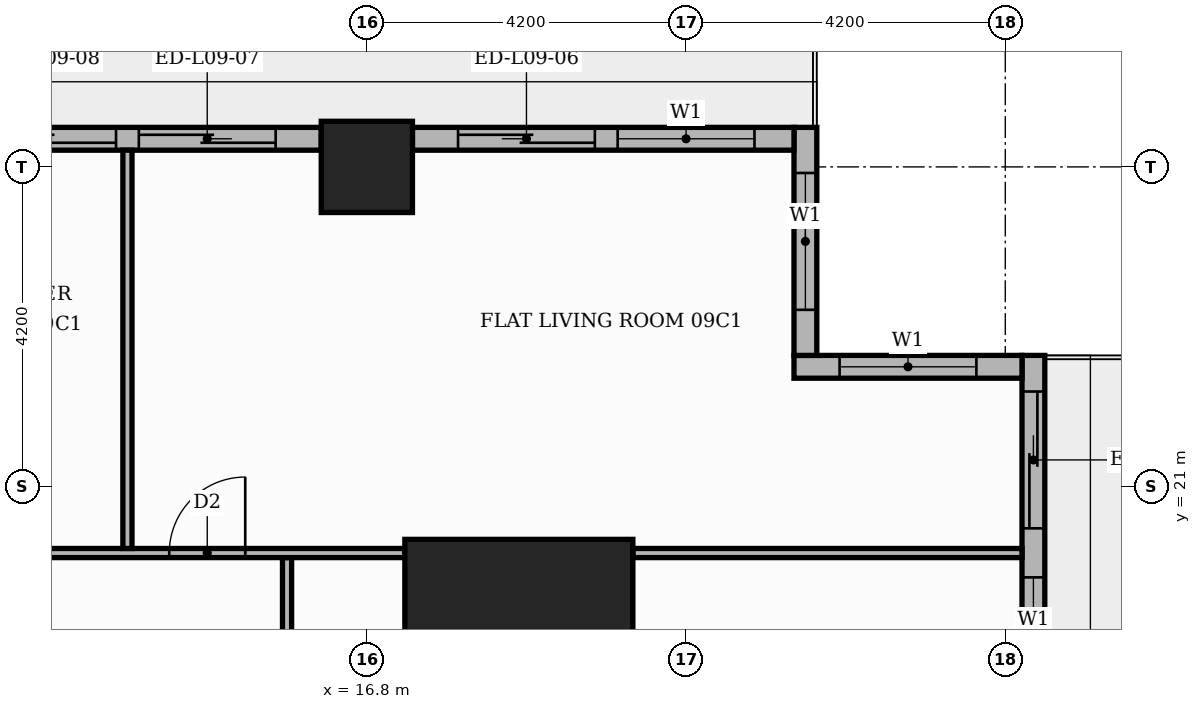
"""IFC4 building model, lengths in metres.
Left out: names, types, materials, properties, quantities, classifications, styles, units other than length and angle.
Written with IfcOpenShell. Run it as: python <this file> out.ifc"""

import sys

from ifc_helpers import new_model, si_unit, direction, frame, frame_2d, origin, origin_2d, place, context, subcontext, project, spatial, rectangle, extrude, element, fill, save


model = new_model("IFC4")
c1 = context("Model", 3, precision=1e-05, world=origin(), true_north=direction((0.0, 1.0)))
c2 = subcontext(c1, "Body", "Model", "MODEL_VIEW")
j1 = project(units=[si_unit("LENGTHUNIT", "METRE"), si_unit("PLANEANGLEUNIT", "RADIAN")], contexts=[c1])
p1 = place(None, origin())
s1 = spatial("IfcSite", under=j1, at=p1, CompositionType="ELEMENT")
p2 = place(p1, origin())
s2 = spatial("IfcBuilding", under=s1, at=p2, CompositionType="ELEMENT")
p3 = place(p2, frame((0.0, 0.0, 42.6)))
s3 = spatial("IfcBuildingStorey", under=s2, at=p3, CompositionType="ELEMENT", Elevation=42.6)
p4 = place(p3, frame((18.8, 18.8, 0.0), z_axis=(0.0, 0.0, 1.0), x_axis=(1.0, 0.0, 0.0)))
e1 = element("IfcColumn", 1, at=p4, inside=s3, PredefinedType="COLUMN", context=c2, shape_type="SweptSolid", body=[
    extrude(rectangle(XDim=3.0, YDim=3.0, at=origin_2d()), origin(), (0.0, 0.0, 1.0), 3.9),
])
p5 = place(p3, frame((16.8, 25.2, 0.0), z_axis=(0.0, 0.0, 1.0), x_axis=(1.0, 0.0, 0.0)))
e2 = element("IfcColumn", 2, at=p5, inside=s3, PredefinedType="COLUMN", context=c2, shape_type="SweptSolid", body=[
    extrude(rectangle(XDim=1.2, YDim=1.2, at=origin_2d()), origin(), (0.0, 0.0, 1.0), 3.9),
])
p6 = place(p3, frame((25.57, 17.4, 0.0), z_axis=(0.0, 0.0, 1.0), x_axis=(0.0, 1.0, 0.0)))
e3 = element("IfcWall", 3, at=p6, inside=s3, PredefinedType="STANDARD", context=c2, shape_type="SweptSolid", body=[
    extrude(rectangle(XDim=5.32, YDim=0.3, at=frame_2d((2.66, 0.0))), origin(), (0.0, 0.0, 1.0), 3.48),
])
p7 = place(p6, frame((0.6, 0.0, 0.9)))
e4 = element("IfcOpeningElement", 4, at=p7, cuts=e3, PredefinedType="OPENING", context=c2, shape_type="SweptSolid", body=[
    extrude(rectangle(XDim=1.8, YDim=2.1, at=frame_2d((0.9, 1.05))), frame((0.0, 0.16, 0.0), z_axis=(0.0, -1.0, 0.0), x_axis=(1.0, 0.0, 0.0)), (0.0, 0.0, 1.0), 0.32),
])
p8 = place(p6, frame((3.045, 0.0, 0.0)))
e5 = element("IfcOpeningElement", 5, at=p8, cuts=e3, PredefinedType="OPENING", context=c2, shape_type="SweptSolid", body=[
    extrude(rectangle(XDim=1.8, YDim=2.4, at=frame_2d((0.9, 1.2))), frame((0.0, 0.16, 0.0), z_axis=(0.0, -1.0, 0.0), x_axis=(1.0, 0.0, 0.0)), (0.0, 0.0, 1.0), 0.32),
])
p9 = place(p3, frame((25.42, 22.57, 0.0), z_axis=(0.0, 0.0, 1.0), x_axis=(-1.0, 0.0, 0.0)))
e6 = element("IfcWall", 6, at=p9, inside=s3, PredefinedType="STANDARD", context=c2, shape_type="SweptSolid", body=[
    extrude(rectangle(XDim=3.0, YDim=0.3, at=frame_2d((1.5, 0.0))), origin(), (0.0, 0.0, 1.0), 3.48),
])
p10 = place(p9, frame((0.6, 0.0, 0.9)))
e7 = element("IfcOpeningElement", 7, at=p10, cuts=e6, PredefinedType="OPENING", context=c2, shape_type="SweptSolid", body=[
    extrude(rectangle(XDim=1.8, YDim=2.1, at=frame_2d((0.9, 1.05))), frame((0.0, 0.16, 0.0), z_axis=(0.0, -1.0, 0.0), x_axis=(1.0, 0.0, 0.0)), (0.0, 0.0, 1.0), 0.32),
])
p11 = place(p3, frame((22.57, 22.72, 0.0), z_axis=(0.0, 0.0, 1.0), x_axis=(0.0, 1.0, 0.0)))
e8 = element("IfcWall", 8, at=p11, inside=s3, PredefinedType="STANDARD", context=c2, shape_type="SweptSolid", body=[
    extrude(rectangle(XDim=3.0, YDim=0.3, at=frame_2d((1.5, 0.0))), origin(), (0.0, 0.0, 1.0), 3.48),
])
p12 = place(p11, frame((0.6, 0.0, 0.9)))
e9 = element("IfcOpeningElement", 9, at=p12, cuts=e8, PredefinedType="OPENING", context=c2, shape_type="SweptSolid", body=[
    extrude(rectangle(XDim=1.8, YDim=2.1, at=frame_2d((0.9, 1.05))), frame((0.0, 0.16, 0.0), z_axis=(0.0, -1.0, 0.0), x_axis=(1.0, 0.0, 0.0)), (0.0, 0.0, 1.0), 0.32),
])
p13 = place(p3, frame((22.42, 25.57, 0.0), z_axis=(0.0, 0.0, 1.0), x_axis=(-1.0, 0.0, 0.0)))
e10 = element("IfcWall", 10, at=p13, inside=s3, PredefinedType="STANDARD", context=c2, shape_type="SweptSolid", body=[
    extrude(rectangle(XDim=5.02, YDim=0.3, at=frame_2d((2.51, 0.0))), origin(), (0.0, 0.0, 1.0), 3.48),
])
p14 = place(p13, frame((0.52, 0.0, 0.9)))
e11 = element("IfcOpeningElement", 11, at=p14, cuts=e10, PredefinedType="OPENING", context=c2, shape_type="SweptSolid", body=[
    extrude(rectangle(XDim=1.8, YDim=2.1, at=frame_2d((0.9, 1.05))), frame((0.0, 0.16, 0.0), z_axis=(0.0, -1.0, 0.0), x_axis=(1.0, 0.0, 0.0)), (0.0, 0.0, 1.0), 0.32),
])
p15 = place(p13, frame((2.62, 0.0, 0.0)))
e12 = element("IfcOpeningElement", 12, at=p15, cuts=e10, PredefinedType="OPENING", context=c2, shape_type="SweptSolid", body=[
    extrude(rectangle(XDim=1.8, YDim=2.4, at=frame_2d((0.9, 1.2))), frame((0.0, 0.16, 0.0), z_axis=(0.0, -1.0, 0.0), x_axis=(1.0, 0.0, 0.0)), (0.0, 0.0, 1.0), 0.32),
])
p16 = place(p3, frame((16.2, 25.57, 0.0), z_axis=(0.0, 0.0, 1.0), x_axis=(-1.0, 0.0, 0.0)))
e13 = element("IfcWall", 13, at=p16, inside=s3, PredefinedType="STANDARD", context=c2, shape_type="SweptSolid", body=[
    extrude(rectangle(XDim=7.2, YDim=0.3, at=frame_2d((3.6, 0.0))), origin(), (0.0, 0.0, 1.0), 3.48),
])
p17 = place(p16, frame((0.6, 0.0, 0.0)))
e14 = element("IfcOpeningElement", 14, at=p17, cuts=e13, PredefinedType="OPENING", context=c2, shape_type="SweptSolid", body=[
    extrude(rectangle(XDim=1.8, YDim=2.4, at=frame_2d((0.9, 1.2))), frame((0.0, 0.16, 0.0), z_axis=(0.0, -1.0, 0.0), x_axis=(1.0, 0.0, 0.0)), (0.0, 0.0, 1.0), 0.32),
])
p18 = place(p16, frame((2.7, 0.0, 0.0)))
e15 = element("IfcOpeningElement", 15, at=p18, cuts=e13, PredefinedType="OPENING", context=c2, shape_type="SweptSolid", body=[
    extrude(rectangle(XDim=1.8, YDim=2.4, at=frame_2d((0.9, 1.2))), frame((0.0, 0.16, 0.0), z_axis=(0.0, -1.0, 0.0), x_axis=(1.0, 0.0, 0.0)), (0.0, 0.0, 1.0), 0.32),
])
p19 = place(p16, frame((4.8, 0.0, 0.9)))
e16 = element("IfcOpeningElement", 16, at=p19, cuts=e13, PredefinedType="OPENING", context=c2, shape_type="SweptSolid", body=[
    extrude(rectangle(XDim=1.8, YDim=2.1, at=frame_2d((0.9, 1.05))), frame((0.0, 0.16, 0.0), z_axis=(0.0, -1.0, 0.0), x_axis=(1.0, 0.0, 0.0)), (0.0, 0.0, 1.0), 0.32),
])
p20 = place(p3, frame((15.75, 13.75, 0.0), z_axis=(0.0, 0.0, 1.0), x_axis=(0.0, 1.0, 0.0)))
e17 = element("IfcWall", 17, at=p20, inside=s3, PredefinedType="PARTITIONING", context=c2, shape_type="SweptSolid", body=[
    extrude(rectangle(XDim=6.31, YDim=0.12, at=frame_2d((3.155, 0.0))), origin(), (0.0, 0.0, 1.0), 3.48),
])
p21 = place(p20, frame((2.635, 0.0, 0.0)))
e18 = element("IfcOpeningElement", 18, at=p21, cuts=e17, PredefinedType="OPENING", context=c2, shape_type="SweptSolid", body=[
    extrude(rectangle(XDim=1.0, YDim=2.1, at=frame_2d((0.5, 1.05))), frame((0.0, 0.07, 0.0), z_axis=(0.0, -1.0, 0.0), x_axis=(1.0, 0.0, 0.0)), (0.0, 0.0, 1.0), 0.14),
])
p22 = place(p3, frame((5.35, 20.12, 0.0), z_axis=(0.0, 0.0, 1.0), x_axis=(1.0, 0.0, 0.0)))
e19 = element("IfcWall", 19, at=p22, inside=s3, PredefinedType="PARTITIONING", context=c2, shape_type="SweptSolid", body=[
    extrude(rectangle(XDim=11.95, YDim=0.12, at=frame_2d((5.975, 0.0))), origin(), (0.0, 0.0, 1.0), 3.48),
])
p23 = place(p22, frame((8.85, 0.0, 0.0)))
e20 = element("IfcOpeningElement", 20, at=p23, cuts=e19, PredefinedType="OPENING", context=c2, shape_type="SweptSolid", body=[
    extrude(rectangle(XDim=1.0, YDim=2.1, at=frame_2d((0.5, 1.05))), frame((0.0, 0.07, 0.0), z_axis=(0.0, -1.0, 0.0), x_axis=(1.0, 0.0, 0.0)), (0.0, 0.0, 1.0), 0.14),
])
p24 = place(p22, frame((5.75, 0.0, 0.0)))
e21 = element("IfcOpeningElement", 21, at=p24, cuts=e19, PredefinedType="OPENING", context=c2, shape_type="SweptSolid", body=[
    extrude(rectangle(XDim=0.9, YDim=2.1, at=frame_2d((0.45, 1.05))), frame((0.0, 0.07, 0.0), z_axis=(0.0, -1.0, 0.0), x_axis=(1.0, 0.0, 0.0)), (0.0, 0.0, 1.0), 0.14),
])
p25 = place(p3, frame((20.3, 20.12, 0.0), z_axis=(0.0, 0.0, 1.0), x_axis=(1.0, 0.0, 0.0)))
e22 = element("IfcWall", 22, at=p25, inside=s3, PredefinedType="PARTITIONING", context=c2, shape_type="SweptSolid", body=[
    extrude(rectangle(XDim=5.12, YDim=0.12, at=frame_2d((2.56, 0.0))), origin(), (0.0, 0.0, 1.0), 3.48),
])
p26 = place(p3, frame((13.65, 20.18, 0.0), z_axis=(0.0, 0.0, 1.0), x_axis=(0.0, 1.0, 0.0)))
e23 = element("IfcWall", 23, at=p26, inside=s3, PredefinedType="PARTITIONING", context=c2, shape_type="SweptSolid", body=[
    extrude(rectangle(XDim=5.24, YDim=0.12, at=frame_2d((2.62, 0.0))), origin(), (0.0, 0.0, 1.0), 3.48),
])
p27 = place(p7, origin())
e24 = element("IfcWindow", 24, at=p27, inside=s3, PartitioningType="SINGLE_PANEL", PredefinedType="WINDOW", context=c2, shape_type="SweptSolid", body=[
    extrude(rectangle(XDim=1.8, YDim=2.1, at=frame_2d((0.9, 1.05))), frame((0.0, 0.03, 0.0), z_axis=(0.0, -1.0, 0.0), x_axis=(1.0, 0.0, 0.0)), (0.0, 0.0, 1.0), 0.06),
])
fill(e4, e24)
p28 = place(p8, origin())
e25 = element("IfcDoor", 25, at=p28, inside=s3, OperationType="SLIDING_TO_RIGHT", PredefinedType="DOOR", context=c2, shape_type="SweptSolid", body=[
    extrude(rectangle(XDim=1.8, YDim=2.4, at=frame_2d((0.9, 1.2))), frame((0.0, 0.025, 0.0), z_axis=(0.0, -1.0, 0.0), x_axis=(1.0, 0.0, 0.0)), (0.0, 0.0, 1.0), 0.05),
])
fill(e5, e25)
p29 = place(p10, origin())
e26 = element("IfcWindow", 26, at=p29, inside=s3, PartitioningType="SINGLE_PANEL", PredefinedType="WINDOW", context=c2, shape_type="SweptSolid", body=[
    extrude(rectangle(XDim=1.8, YDim=2.1, at=frame_2d((0.9, 1.05))), frame((0.0, 0.03, 0.0), z_axis=(0.0, -1.0, 0.0), x_axis=(1.0, 0.0, 0.0)), (0.0, 0.0, 1.0), 0.06),
])
fill(e7, e26)
p30 = place(p12, origin())
e27 = element("IfcWindow", 27, at=p30, inside=s3, PartitioningType="SINGLE_PANEL", PredefinedType="WINDOW", context=c2, shape_type="SweptSolid", body=[
    extrude(rectangle(XDim=1.8, YDim=2.1, at=frame_2d((0.9, 1.05))), frame((0.0, 0.03, 0.0), z_axis=(0.0, -1.0, 0.0), x_axis=(1.0, 0.0, 0.0)), (0.0, 0.0, 1.0), 0.06),
])
fill(e9, e27)
p31 = place(p14, origin())
e28 = element("IfcWindow", 28, at=p31, inside=s3, PartitioningType="SINGLE_PANEL", PredefinedType="WINDOW", context=c2, shape_type="SweptSolid", body=[
    extrude(rectangle(XDim=1.8, YDim=2.1, at=frame_2d((0.9, 1.05))), frame((0.0, 0.03, 0.0), z_axis=(0.0, -1.0, 0.0), x_axis=(1.0, 0.0, 0.0)), (0.0, 0.0, 1.0), 0.06),
])
fill(e11, e28)
p32 = place(p15, origin())
e29 = element("IfcDoor", 29, at=p32, inside=s3, OperationType="SLIDING_TO_RIGHT", PredefinedType="DOOR", context=c2, shape_type="SweptSolid", body=[
    extrude(rectangle(XDim=1.8, YDim=2.4, at=frame_2d((0.9, 1.2))), frame((0.0, 0.025, 0.0), z_axis=(0.0, -1.0, 0.0), x_axis=(1.0, 0.0, 0.0)), (0.0, 0.0, 1.0), 0.05),
])
fill(e12, e29)
p33 = place(p17, origin())
e30 = element("IfcDoor", 30, at=p33, inside=s3, OperationType="SLIDING_TO_LEFT", PredefinedType="DOOR", context=c2, shape_type="SweptSolid", body=[
    extrude(rectangle(XDim=1.8, YDim=2.4, at=frame_2d((0.9, 1.2))), frame((0.0, 0.025, 0.0), z_axis=(0.0, -1.0, 0.0), x_axis=(1.0, 0.0, 0.0)), (0.0, 0.0, 1.0), 0.05),
])
fill(e14, e30)
p34 = place(p18, origin())
e31 = element("IfcDoor", 31, at=p34, inside=s3, OperationType="SLIDING_TO_RIGHT", PredefinedType="DOOR", context=c2, shape_type="SweptSolid", body=[
    extrude(rectangle(XDim=1.8, YDim=2.4, at=frame_2d((0.9, 1.2))), frame((0.0, 0.025, 0.0), z_axis=(0.0, -1.0, 0.0), x_axis=(1.0, 0.0, 0.0)), (0.0, 0.0, 1.0), 0.05),
])
fill(e15, e31)
p35 = place(p23, origin())
e32 = element("IfcDoor", 32, at=p35, inside=s3, OperationType="SINGLE_SWING_RIGHT", PredefinedType="DOOR", context=c2, shape_type="SweptSolid", body=[
    extrude(rectangle(XDim=1.0, YDim=2.1, at=frame_2d((0.5, 1.05))), frame((0.0, 0.025, 0.0), z_axis=(0.0, -1.0, 0.0), x_axis=(1.0, 0.0, 0.0)), (0.0, 0.0, 1.0), 0.05),
])
fill(e20, e32)
save(model, sys.argv[1])
